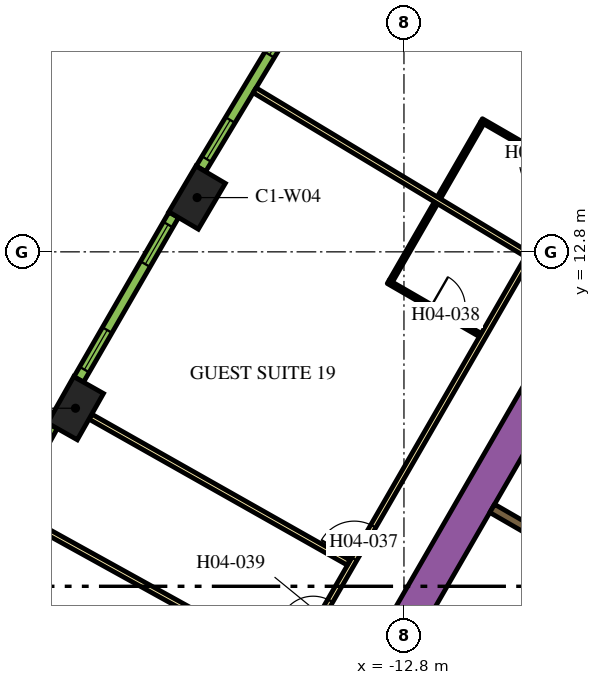
"""IFC4 building model, lengths in metres.
Left out: names, types, materials, properties, quantities, classifications, styles, units other than length and angle.
Written with IfcOpenShell. Run it as: python <this file> out.ifc"""

import sys

from ifc_helpers import new_model, si_unit, direction, frame, frame_2d, origin, origin_2d, place, context, subcontext, project, spatial, rectangle, extrude, element, fill, save


model = new_model("IFC4")
c1 = context("Model", 3, precision=1e-05, world=origin(), true_north=direction((0.0, 1.0)))
c2 = subcontext(c1, "Body", "Model", "MODEL_VIEW")
j1 = project(units=[si_unit("LENGTHUNIT", "METRE"), si_unit("PLANEANGLEUNIT", "RADIAN")], contexts=[c1])
p1 = place(None, origin())
s1 = spatial("IfcSite", under=j1, at=p1, CompositionType="ELEMENT")
p2 = place(p1, origin())
s2 = spatial("IfcBuilding", under=s1, at=p2, CompositionType="ELEMENT")
p3 = place(p2, frame((0.0, 0.0, 62.7)))
s3 = spatial("IfcBuildingStorey", under=s2, at=p3, CompositionType="ELEMENT", Elevation=62.7)
for number, where, z_axis, x_axis in (
    (1, (-18.243, 14.228, 0.0), (0.0, 0.0, 1.0), (-0.508, -0.861, 0.0)),
    (2, (-21.443, 8.685, 0.0), (0.0, 0.0, 1.0), (-0.492, -0.871, 0.0)),
):
    element("IfcColumn", number, at=place(p3, frame(where, z_axis=z_axis, x_axis=x_axis)), inside=s3, PredefinedType="COLUMN", context=c2, shape_type="SweptSolid", body=[
        extrude(rectangle(XDim=1.4, YDim=0.9, at=origin_2d()), origin(), (0.0, 0.0, 1.0), 3.9),
    ])
p4 = place(p3, frame((-14.268, 0.387, 0.0), z_axis=(0.0, 0.0, 1.0), x_axis=(0.499994617707, 0.866028511231, 0.0)))
e3 = element("IfcWall", 3, at=p4, inside=s3, PredefinedType="SOLIDWALL", context=c2, shape_type="SweptSolid", body=[
    extrude(rectangle(XDim=18.817, YDim=0.9, at=frame_2d((9.409, 0.0))), origin(), (0.0, 0.0, 1.0), 3.9),
])
p5 = place(p3, frame((-8.574, 4.95, 0.0), z_axis=(0.0, 0.0, 1.0), x_axis=(-0.866008176907, 0.50002983664, 0.0)))
e4 = element("IfcWall", 4, at=p5, inside=s3, PredefinedType="SOLIDWALL", context=c2, shape_type="SweptSolid", body=[
    extrude(rectangle(XDim=2.2, YDim=0.25, at=frame_2d((1.1, 0.0))), origin(), (0.0, 0.0, 1.0), 3.9),
])
p6 = place(p3, frame((-6.008, 9.144, 0.0), z_axis=(0.0, 0.0, 1.0), x_axis=(-0.500006956611, -0.866021387346, 0.0)))
e5 = element("IfcWall", 5, at=p6, inside=s3, PredefinedType="SOLIDWALL", context=c2, shape_type="SweptSolid", body=[
    extrude(rectangle(XDim=9.83, YDim=0.25, at=frame_2d((4.915, 0.0))), origin(), (0.0, 0.0, 1.0), 3.9),
])
p7 = place(p6, frame((6.985, 0.0, 0.0)))
e6 = element("IfcOpeningElement", 6, at=p7, cuts=e5, PredefinedType="OPENING", context=c2, shape_type="SweptSolid", body=[
    extrude(rectangle(XDim=0.9, YDim=2.1, at=frame_2d((0.45, 1.05))), frame((0.0, 0.135, 0.0), z_axis=(0.0, -1.0, 0.0), x_axis=(1.0, 0.0, 0.0)), (0.0, 0.0, 1.0), 0.27),
])
p8 = place(p3, frame((-19.081, -3.9, 0.0), z_axis=(0.0, 0.0, 1.0), x_axis=(0.499998313975, 0.866026377209, 0.0)))
e7 = element("IfcWall", 7, at=p8, inside=s3, PredefinedType="PARTITIONING", context=c2, shape_type="SweptSolid", body=[
    extrude(rectangle(XDim=25.766, YDim=0.15, at=frame_2d((12.883, 0.0))), origin(), (0.0, 0.0, 1.0), 2.75),
])
p9 = place(p8, frame((24.586, 0.0, 0.0)))
e8 = element("IfcOpeningElement", 8, at=p9, cuts=e7, PredefinedType="OPENING", context=c2, shape_type="SweptSolid", body=[
    extrude(rectangle(XDim=1.0, YDim=2.1, at=frame_2d((0.5, 1.05))), frame((0.0, 0.085, 0.0), z_axis=(0.0, -1.0, 0.0), x_axis=(1.0, 0.0, 0.0)), (0.0, 0.0, 1.0), 0.17),
])
p10 = place(p8, frame((9.948, 0.0, 0.0)))
e9 = element("IfcOpeningElement", 9, at=p10, cuts=e7, PredefinedType="OPENING", context=c2, shape_type="SweptSolid", body=[
    extrude(rectangle(XDim=1.0, YDim=2.1, at=frame_2d((0.5, 1.05))), frame((0.0, 0.085, 0.0), z_axis=(0.0, -1.0, 0.0), x_axis=(1.0, 0.0, 0.0)), (0.0, 0.0, 1.0), 0.17),
])
p11 = place(p8, frame((7.782, 0.0, 0.0)))
e10 = element("IfcOpeningElement", 10, at=p11, cuts=e7, PredefinedType="OPENING", context=c2, shape_type="SweptSolid", body=[
    extrude(rectangle(XDim=0.9, YDim=2.1, at=frame_2d((0.45, 1.05))), frame((0.0, 0.085, 0.0), z_axis=(0.0, -1.0, 0.0), x_axis=(1.0, 0.0, 0.0)), (0.0, 0.0, 1.0), 0.17),
])
p12 = place(p8, frame((4.658, 0.0, 0.0)))
e11 = element("IfcOpeningElement", 11, at=p12, cuts=e7, PredefinedType="OPENING", context=c2, shape_type="SweptSolid", body=[
    extrude(rectangle(XDim=0.9, YDim=2.1, at=frame_2d((0.45, 1.05))), frame((0.0, 0.085, 0.0), z_axis=(0.0, -1.0, 0.0), x_axis=(1.0, 0.0, 0.0)), (0.0, 0.0, 1.0), 0.17),
])
p13 = place(p3, frame((-23.132, 5.962, 0.0), z_axis=(0.0, 0.0, 1.0), x_axis=(0.875121716713, -0.483902863121, 0.0)))
e12 = element("IfcWall", 12, at=p13, inside=s3, PredefinedType="PARTITIONING", context=c2, shape_type="SweptSolid", body=[
    extrude(rectangle(XDim=8.355, YDim=0.15, at=frame_2d((4.178, 0.0))), origin(), (0.0, 0.0, 1.0), 2.75),
])
p14 = place(p3, frame((-21.052, 8.464, 0.0), z_axis=(0.0, 0.0, 1.0), x_axis=(0.87059371954, -0.492002617368, 0.0)))
e13 = element("IfcWall", 13, at=p14, inside=s3, PredefinedType="PARTITIONING", context=c2, shape_type="SweptSolid", body=[
    extrude(rectangle(XDim=7.803, YDim=0.15, at=frame_2d((3.902, 0.0))), origin(), (0.0, 0.0, 1.0), 2.75),
])
p15 = place(p3, frame((-16.729, 17.052, 0.0), z_axis=(0.0, 0.0, 1.0), x_axis=(0.856630606266, -0.515930232113, 0.0)))
e14 = element("IfcWall", 14, at=p15, inside=s3, PredefinedType="PARTITIONING", context=c2, shape_type="SweptSolid", body=[
    extrude(rectangle(XDim=8.355, YDim=0.15, at=frame_2d((4.178, 0.0))), origin(), (0.0, 0.0, 1.0), 2.75),
])
p16 = place(p3, frame((-8.337, 14.861, 0.0), z_axis=(0.0, 0.0, 1.0), x_axis=(-0.866034573852, 0.49998411664, 0.0)))
e15 = element("IfcWall", 15, at=p16, inside=s3, PredefinedType="PARTITIONING", context=c2, shape_type="SweptSolid", body=[
    extrude(rectangle(XDim=2.8, YDim=0.1, at=frame_2d((1.4, 0.0))), origin(), (0.0, 0.0, 1.0), 2.75),
])
p17 = place(p16, frame((0.6, 0.0, 0.0)))
e16 = element("IfcOpeningElement", 16, at=p17, cuts=e15, PredefinedType="OPENING", context=c2, shape_type="SweptSolid", body=[
    extrude(rectangle(XDim=0.9, YDim=2.1, at=frame_2d((0.45, 1.05))), frame((0.0, 0.06, 0.0), z_axis=(0.0, -1.0, 0.0), x_axis=(1.0, 0.0, 0.0)), (0.0, 0.0, 1.0), 0.12),
])
p18 = place(p3, frame((-10.743, 16.192, 0.0), z_axis=(0.0, 0.0, 1.0), x_axis=(-0.500014167291, -0.866017224141, 0.0)))
e17 = element("IfcWall", 17, at=p18, inside=s3, PredefinedType="PARTITIONING", context=c2, shape_type="SweptSolid", body=[
    extrude(rectangle(XDim=2.27, YDim=0.1, at=frame_2d((1.135, 0.0))), origin(), (0.0, 0.0, 1.0), 2.75),
])
p19 = place(p3, frame((-13.215, 12.011, 0.0), z_axis=(0.0, 0.0, 1.0), x_axis=(0.865996816683, -0.500049511043, 0.0)))
e18 = element("IfcWall", 18, at=p19, inside=s3, PredefinedType="PARTITIONING", context=c2, shape_type="SweptSolid", body=[
    extrude(rectangle(XDim=2.8, YDim=0.1, at=frame_2d((1.4, 0.0))), origin(), (0.0, 0.0, 1.0), 2.75),
])
p20 = place(p19, frame((1.3, 0.0, 0.0)))
e19 = element("IfcOpeningElement", 19, at=p20, cuts=e18, PredefinedType="OPENING", context=c2, shape_type="SweptSolid", body=[
    extrude(rectangle(XDim=0.9, YDim=2.1, at=frame_2d((0.45, 1.05))), frame((0.0, 0.06, 0.0), z_axis=(0.0, -1.0, 0.0), x_axis=(1.0, 0.0, 0.0)), (0.0, 0.0, 1.0), 0.12),
])
p21 = place(p3, frame((-13.147, 12.029, 0.0), z_axis=(0.0, 0.0, 1.0), x_axis=(0.499939447199, 0.866060361138, 0.0)))
e20 = element("IfcWall", 20, at=p21, inside=s3, PredefinedType="PARTITIONING", context=c2, shape_type="SweptSolid", body=[
    extrude(rectangle(XDim=2.37, YDim=0.1, at=frame_2d((1.185, 0.0))), origin(), (0.0, 0.0, 1.0), 2.75),
])
p22 = place(p3, frame((-15.564, 19.267, 0.0), z_axis=(0.0, 0.0, 1.0), x_axis=(-0.515938796285, -0.856625448191, 0.0)))
e21 = element("IfcWall", 21, at=p22, inside=s3, PredefinedType="SOLIDWALL", context=c2, shape_type="SweptSolid", body=[
    extrude(rectangle(XDim=4.998, YDim=0.29, at=frame_2d((2.499, 0.0))), origin(), (0.0, 0.0, 1.0), 3.65),
])
p23 = place(p22, frame((0.297, 0.0, 0.9)))
e22 = element("IfcOpeningElement", 22, at=p23, cuts=e21, PredefinedType="OPENING", context=c2, shape_type="SweptSolid", body=[
    extrude(rectangle(XDim=1.2, YDim=2.15, at=frame_2d((0.6, 1.075))), frame((0.0, 0.155, 0.0), z_axis=(0.0, -1.0, 0.0), x_axis=(1.0, 0.0, 0.0)), (0.0, 0.0, 1.0), 0.31),
])
p24 = place(p22, frame((3.501, 0.0, 0.9)))
e23 = element("IfcOpeningElement", 23, at=p24, cuts=e21, PredefinedType="OPENING", context=c2, shape_type="SweptSolid", body=[
    extrude(rectangle(XDim=1.2, YDim=2.15, at=frame_2d((0.6, 1.075))), frame((0.0, 0.155, 0.0), z_axis=(0.0, -1.0, 0.0), x_axis=(1.0, 0.0, 0.0)), (0.0, 0.0, 1.0), 0.31),
])
p25 = place(p3, frame((-18.858, 13.773, 0.0), z_axis=(0.0, 0.0, 1.0), x_axis=(-0.50002123722, -0.866013142123, 0.0)))
e24 = element("IfcWall", 24, at=p25, inside=s3, PredefinedType="SOLIDWALL", context=c2, shape_type="SweptSolid", body=[
    extrude(rectangle(XDim=4.998, YDim=0.29, at=frame_2d((2.499, 0.0))), origin(), (0.0, 0.0, 1.0), 3.65),
])
p26 = place(p25, frame((0.297, 0.0, 0.9)))
e25 = element("IfcOpeningElement", 25, at=p26, cuts=e24, PredefinedType="OPENING", context=c2, shape_type="SweptSolid", body=[
    extrude(rectangle(XDim=1.2, YDim=2.15, at=frame_2d((0.6, 1.075))), frame((0.0, 0.155, 0.0), z_axis=(0.0, -1.0, 0.0), x_axis=(1.0, 0.0, 0.0)), (0.0, 0.0, 1.0), 0.31),
])
p27 = place(p25, frame((3.501, 0.0, 0.9)))
e26 = element("IfcOpeningElement", 26, at=p27, cuts=e24, PredefinedType="OPENING", context=c2, shape_type="SweptSolid", body=[
    extrude(rectangle(XDim=1.2, YDim=2.15, at=frame_2d((0.6, 1.075))), frame((0.0, 0.155, 0.0), z_axis=(0.0, -1.0, 0.0), x_axis=(1.0, 0.0, 0.0)), (0.0, 0.0, 1.0), 0.31),
])
p28 = place(p3, frame((-22.05, 8.22, 0.0), z_axis=(0.0, 0.0, 1.0), x_axis=(-0.483912572871, -0.875116347589, 0.0)))
e27 = element("IfcWall", 27, at=p28, inside=s3, PredefinedType="SOLIDWALL", context=c2, shape_type="SweptSolid", body=[
    extrude(rectangle(XDim=4.998, YDim=0.29, at=frame_2d((2.499, 0.0))), origin(), (0.0, 0.0, 1.0), 3.65),
])
p29 = place(p28, frame((0.297, 0.0, 0.9)))
e28 = element("IfcOpeningElement", 28, at=p29, cuts=e27, PredefinedType="OPENING", context=c2, shape_type="SweptSolid", body=[
    extrude(rectangle(XDim=1.2, YDim=2.15, at=frame_2d((0.6, 1.075))), frame((0.0, 0.155, 0.0), z_axis=(0.0, -1.0, 0.0), x_axis=(1.0, 0.0, 0.0)), (0.0, 0.0, 1.0), 0.31),
])
p30 = place(p28, frame((3.501, 0.0, 0.9)))
e29 = element("IfcOpeningElement", 29, at=p30, cuts=e27, PredefinedType="OPENING", context=c2, shape_type="SweptSolid", body=[
    extrude(rectangle(XDim=1.2, YDim=2.15, at=frame_2d((0.6, 1.075))), frame((0.0, 0.155, 0.0), z_axis=(0.0, -1.0, 0.0), x_axis=(1.0, 0.0, 0.0)), (0.0, 0.0, 1.0), 0.31),
])
p31 = place(p10, origin())
e30 = element("IfcDoor", 30, at=p31, inside=s3, OperationType="SINGLE_SWING_LEFT", PredefinedType="DOOR", context=c2, shape_type="SweptSolid", body=[
    extrude(rectangle(XDim=1.0, YDim=2.1, at=frame_2d((0.5, 1.05))), frame((0.0, 0.025, 0.0), z_axis=(0.0, -1.0, 0.0), x_axis=(1.0, 0.0, 0.0)), (0.0, 0.0, 1.0), 0.05),
])
fill(e9, e30)
p32 = place(p20, origin())
e31 = element("IfcDoor", 31, at=p32, inside=s3, OperationType="SINGLE_SWING_LEFT", PredefinedType="DOOR", context=c2, shape_type="SweptSolid", body=[
    extrude(rectangle(XDim=0.9, YDim=2.1, at=frame_2d((0.45, 1.05))), frame((0.0, 0.025, 0.0), z_axis=(0.0, -1.0, 0.0), x_axis=(1.0, 0.0, 0.0)), (0.0, 0.0, 1.0), 0.05),
])
fill(e19, e31)
p33 = place(p11, origin())
e32 = element("IfcDoor", 32, at=p33, inside=s3, OperationType="SINGLE_SWING_RIGHT", PredefinedType="DOOR", context=c2, shape_type="SweptSolid", body=[
    extrude(rectangle(XDim=0.9, YDim=2.1, at=frame_2d((0.45, 1.05))), frame((0.0, 0.025, 0.0), z_axis=(0.0, -1.0, 0.0), x_axis=(1.0, 0.0, 0.0)), (0.0, 0.0, 1.0), 0.05),
])
fill(e10, e32)
p34 = place(p23, origin())
e33 = element("IfcWindow", 33, at=p34, inside=s3, PartitioningType="DOUBLE_PANEL_VERTICAL", PredefinedType="WINDOW", context=c2, shape_type="SweptSolid", body=[
    extrude(rectangle(XDim=1.2, YDim=2.15, at=frame_2d((0.6, 1.075))), frame((0.0, 0.015, 0.0), z_axis=(0.0, -1.0, 0.0), x_axis=(1.0, 0.0, 0.0)), (0.0, 0.0, 1.0), 0.06),
])
fill(e22, e33)
p35 = place(p24, origin())
e34 = element("IfcWindow", 34, at=p35, inside=s3, PartitioningType="DOUBLE_PANEL_VERTICAL", PredefinedType="WINDOW", context=c2, shape_type="SweptSolid", body=[
    extrude(rectangle(XDim=1.2, YDim=2.15, at=frame_2d((0.6, 1.075))), frame((0.0, 0.015, 0.0), z_axis=(0.0, -1.0, 0.0), x_axis=(1.0, 0.0, 0.0)), (0.0, 0.0, 1.0), 0.06),
])
fill(e23, e34)
p36 = place(p26, origin())
e35 = element("IfcWindow", 35, at=p36, inside=s3, PartitioningType="DOUBLE_PANEL_VERTICAL", PredefinedType="WINDOW", context=c2, shape_type="SweptSolid", body=[
    extrude(rectangle(XDim=1.2, YDim=2.15, at=frame_2d((0.6, 1.075))), frame((0.0, 0.015, 0.0), z_axis=(0.0, -1.0, 0.0), x_axis=(1.0, 0.0, 0.0)), (0.0, 0.0, 1.0), 0.06),
])
fill(e25, e35)
p37 = place(p27, origin())
e36 = element("IfcWindow", 36, at=p37, inside=s3, PartitioningType="DOUBLE_PANEL_VERTICAL", PredefinedType="WINDOW", context=c2, shape_type="SweptSolid", body=[
    extrude(rectangle(XDim=1.2, YDim=2.15, at=frame_2d((0.6, 1.075))), frame((0.0, 0.015, 0.0), z_axis=(0.0, -1.0, 0.0), x_axis=(1.0, 0.0, 0.0)), (0.0, 0.0, 1.0), 0.06),
])
fill(e26, e36)
save(model, sys.argv[1])
